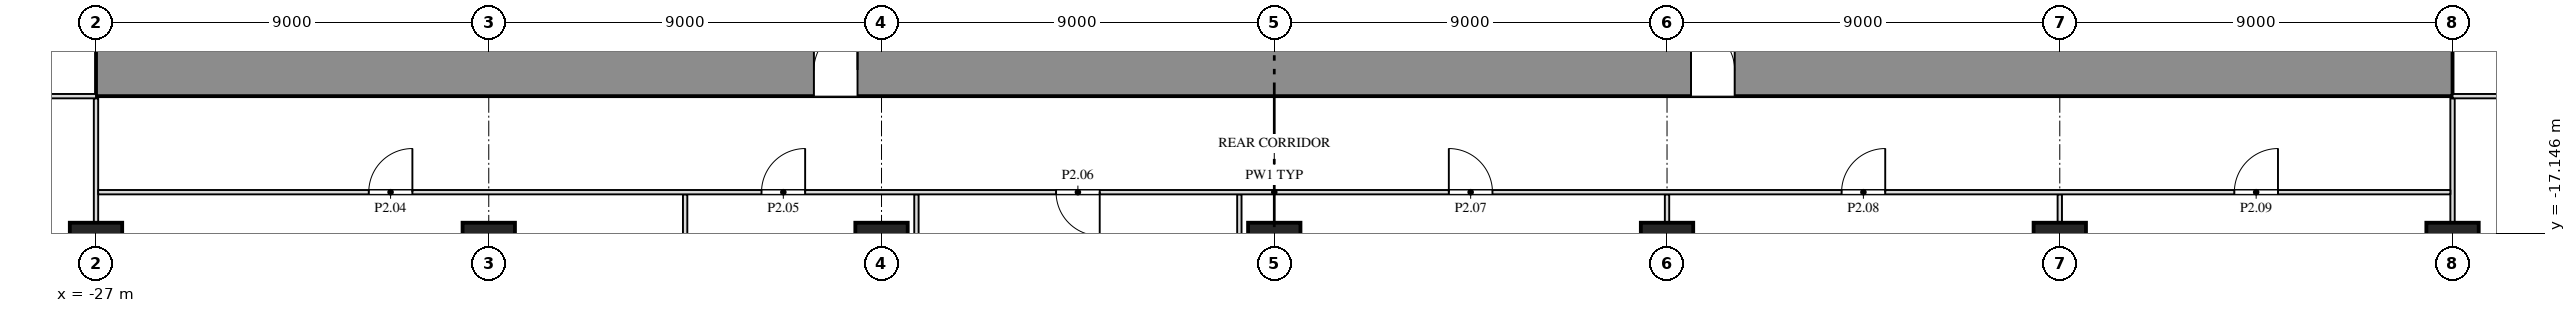
"""IFC4 building model, lengths in metres.
Left out: names, types, materials, properties, quantities, classifications, styles, units other than length and angle.
Written with IfcOpenShell. Run it as: python <this file> out.ifc"""

import sys

from ifc_helpers import new_model, si_unit, direction, frame, frame_2d, origin, origin_2d, place, context, subcontext, project, spatial, rectangle, extrude, element, fill, save


model = new_model("IFC4")
c1 = context("Model", 3, precision=1e-05, world=origin(), true_north=direction((0.0, 1.0)))
c2 = subcontext(c1, "Body", "Model", "MODEL_VIEW")
j1 = project(units=[si_unit("LENGTHUNIT", "METRE"), si_unit("PLANEANGLEUNIT", "RADIAN")], contexts=[c1])
p1 = place(None, origin())
s1 = spatial("IfcSite", under=j1, at=p1, CompositionType="ELEMENT")
p2 = place(p1, origin())
s2 = spatial("IfcBuilding", under=s1, at=p2, CompositionType="ELEMENT")
p3 = place(p2, frame((0.0, 0.0, 15.0)))
s3 = spatial("IfcBuildingStorey", under=s2, at=p3, CompositionType="ELEMENT", Elevation=15.0)
for number, where, z_axis, x_axis in (
    (1, (-27.0, -17.5, 0.0), (0.0, 0.0, 1.0), (1.0, 0.0, 0.0)),
    (2, (-18.0, -17.5, 0.0), (0.0, 0.0, 1.0), (1.0, 0.0, 0.0)),
    (3, (-9.0, -17.5, 0.0), (0.0, 0.0, 1.0), (1.0, 0.0, 0.0)),
    (4, (0.0, -17.5, 0.0), (0.0, 0.0, 1.0), (1.0, 0.0, 0.0)),
    (5, (9.0, -17.5, 0.0), (0.0, 0.0, 1.0), (1.0, 0.0, 0.0)),
    (6, (18.0, -17.5, 0.0), (0.0, 0.0, 1.0), (1.0, 0.0, 0.0)),
    (7, (27.0, -17.5, 0.0), (0.0, 0.0, 1.0), (1.0, 0.0, 0.0)),
):
    element("IfcColumn", number, at=place(p3, frame(where, z_axis=z_axis, x_axis=x_axis)), inside=s3, PredefinedType="COLUMN", context=c2, shape_type="SweptSolid", body=[
        extrude(rectangle(XDim=1.2, YDim=1.2, at=origin_2d()), origin(), (0.0, 0.0, 1.0), 6.0),
    ])
p4 = place(p3, frame((-27.0, -13.4, 0.0), z_axis=(0.0, 0.0, 1.0), x_axis=(1.0, 0.0, 0.0)))
e8 = element("IfcWall", 8, at=p4, inside=s3, PredefinedType="SHEAR", context=c2, shape_type="SweptSolid", body=[
    extrude(rectangle(XDim=54.0, YDim=1.2, at=frame_2d((27.0, 0.0))), origin(), (0.0, 0.0, 1.0), 5.7),
])
p5 = place(p4, frame((16.45, 0.0, 0.0)))
e9 = element("IfcOpeningElement", 9, at=p5, cuts=e8, PredefinedType="OPENING", context=c2, shape_type="SweptSolid", body=[
    extrude(rectangle(XDim=1.0, YDim=2.1, at=frame_2d((0.5, 1.05))), frame((0.0, 0.612, 0.0), z_axis=(0.0, -1.0, 0.0), x_axis=(1.0, 0.0, 0.0)), (0.0, 0.0, 1.0), 1.224),
])
p6 = place(p4, frame((36.55, 0.0, 0.0)))
e10 = element("IfcOpeningElement", 10, at=p6, cuts=e8, PredefinedType="OPENING", context=c2, shape_type="SweptSolid", body=[
    extrude(rectangle(XDim=1.0, YDim=2.1, at=frame_2d((0.5, 1.05))), frame((0.0, 0.612, 0.0), z_axis=(0.0, -1.0, 0.0), x_axis=(1.0, 0.0, 0.0)), (0.0, 0.0, 1.0), 1.224),
])
p7 = place(p3, frame((-27.0, -16.9, 0.0), z_axis=(0.0, 0.0, 1.0), x_axis=(0.0, 1.0, 0.0)))
e11 = element("IfcWall", 11, at=p7, inside=s3, PredefinedType="PARTITIONING", context=c2, shape_type="SweptSolid", body=[
    extrude(rectangle(XDim=2.85, YDim=0.1, at=frame_2d((1.425, 0.0))), origin(), (0.0, 0.0, 1.0), 5.088),
])
p8 = place(p3, frame((-13.5, -26.663, 0.0), z_axis=(0.0, 0.0, 1.0), x_axis=(0.0, 1.0, 0.0)))
e12 = element("IfcWall", 12, at=p8, inside=s3, PredefinedType="PARTITIONING", context=c2, shape_type="SweptSolid", body=[
    extrude(rectangle(XDim=10.413, YDim=0.1, at=frame_2d((5.206, 0.0))), origin(), (0.0, 0.0, 1.0), 5.088),
])
for number, where, z_axis, x_axis in (
    (13, (-8.2, -27.2, 0.0), (0.0, 0.0, 1.0), (0.0, 1.0, 0.0)),
    (14, (-0.8, -27.2, 0.0), (0.0, 0.0, 1.0), (0.0, 1.0, 0.0)),
):
    element("IfcWall", number, at=place(p3, frame(where, z_axis=z_axis, x_axis=x_axis)), inside=s3, PredefinedType="PARTITIONING", context=c2, shape_type="SweptSolid", body=[
        extrude(rectangle(XDim=10.95, YDim=0.1, at=frame_2d((5.475, 0.0))), origin(), (0.0, 0.0, 1.0), 5.7),
    ])
for number, where, z_axis, x_axis in (
    (15, (9.0, -16.9, 0.0), (0.0, 0.0, 1.0), (0.0, 1.0, 0.0)),
    (16, (18.0, -16.9, 0.0), (0.0, 0.0, 1.0), (0.0, 1.0, 0.0)),
):
    element("IfcWall", number, at=place(p3, frame(where, z_axis=z_axis, x_axis=x_axis)), inside=s3, PredefinedType="PARTITIONING", context=c2, shape_type="SweptSolid", body=[
        extrude(rectangle(XDim=0.65, YDim=0.1, at=frame_2d((0.325, 0.0))), origin(), (0.0, 0.0, 1.0), 5.7),
    ])
p9 = place(p3, frame((27.0, -16.9, 0.0), z_axis=(0.0, 0.0, 1.0), x_axis=(0.0, 1.0, 0.0)))
e17 = element("IfcWall", 17, at=p9, inside=s3, PredefinedType="PARTITIONING", context=c2, shape_type="SweptSolid", body=[
    extrude(rectangle(XDim=2.85, YDim=0.1, at=frame_2d((1.425, 0.0))), origin(), (0.0, 0.0, 1.0), 5.088),
])
p10 = place(p3, frame((-26.95, -16.2, 0.0), z_axis=(0.0, 0.0, 1.0), x_axis=(1.0, 0.0, 0.0)))
e18 = element("IfcWall", 18, at=p10, inside=s3, PredefinedType="PARTITIONING", context=c2, shape_type="SweptSolid", body=[
    extrude(rectangle(XDim=53.9, YDim=0.1, at=frame_2d((26.95, 0.0))), origin(), (0.0, 0.0, 1.0), 5.7),
])
p11 = place(p10, frame((6.2, 0.0, 0.0)))
e19 = element("IfcOpeningElement", 19, at=p11, cuts=e18, PredefinedType="OPENING", context=c2, shape_type="SweptSolid", body=[
    extrude(rectangle(XDim=1.0, YDim=2.1, at=frame_2d((0.5, 1.05))), frame((0.0, 0.062, 0.0), z_axis=(0.0, -1.0, 0.0), x_axis=(1.0, 0.0, 0.0)), (0.0, 0.0, 1.0), 0.124),
])
p12 = place(p10, frame((15.2, 0.0, 0.0)))
e20 = element("IfcOpeningElement", 20, at=p12, cuts=e18, PredefinedType="OPENING", context=c2, shape_type="SweptSolid", body=[
    extrude(rectangle(XDim=1.0, YDim=2.1, at=frame_2d((0.5, 1.05))), frame((0.0, 0.062, 0.0), z_axis=(0.0, -1.0, 0.0), x_axis=(1.0, 0.0, 0.0)), (0.0, 0.0, 1.0), 0.124),
])
p13 = place(p10, frame((21.95, 0.0, 0.0)))
e21 = element("IfcOpeningElement", 21, at=p13, cuts=e18, PredefinedType="OPENING", context=c2, shape_type="SweptSolid", body=[
    extrude(rectangle(XDim=1.0, YDim=2.1, at=frame_2d((0.5, 1.05))), frame((0.0, 0.062, 0.0), z_axis=(0.0, -1.0, 0.0), x_axis=(1.0, 0.0, 0.0)), (0.0, 0.0, 1.0), 0.124),
])
p14 = place(p10, frame((30.95, 0.0, 0.0)))
e22 = element("IfcOpeningElement", 22, at=p14, cuts=e18, PredefinedType="OPENING", context=c2, shape_type="SweptSolid", body=[
    extrude(rectangle(XDim=1.0, YDim=2.1, at=frame_2d((0.5, 1.05))), frame((0.0, 0.062, 0.0), z_axis=(0.0, -1.0, 0.0), x_axis=(1.0, 0.0, 0.0)), (0.0, 0.0, 1.0), 0.124),
])
p15 = place(p10, frame((39.95, 0.0, 0.0)))
e23 = element("IfcOpeningElement", 23, at=p15, cuts=e18, PredefinedType="OPENING", context=c2, shape_type="SweptSolid", body=[
    extrude(rectangle(XDim=1.0, YDim=2.1, at=frame_2d((0.5, 1.05))), frame((0.0, 0.062, 0.0), z_axis=(0.0, -1.0, 0.0), x_axis=(1.0, 0.0, 0.0)), (0.0, 0.0, 1.0), 0.124),
])
p16 = place(p10, frame((48.95, 0.0, 0.0)))
e24 = element("IfcOpeningElement", 24, at=p16, cuts=e18, PredefinedType="OPENING", context=c2, shape_type="SweptSolid", body=[
    extrude(rectangle(XDim=1.0, YDim=2.1, at=frame_2d((0.5, 1.05))), frame((0.0, 0.062, 0.0), z_axis=(0.0, -1.0, 0.0), x_axis=(1.0, 0.0, 0.0)), (0.0, 0.0, 1.0), 0.124),
])
p17 = place(p3, frame((-38.2, -14.0, 0.0), z_axis=(0.0, 0.0, 1.0), x_axis=(1.0, 0.0, 0.0)))
e25 = element("IfcWall", 25, at=p17, inside=s3, PredefinedType="PARTITIONING", context=c2, shape_type="SweptSolid", body=[
    extrude(rectangle(XDim=11.2, YDim=0.1, at=frame_2d((5.6, 0.0))), origin(), (0.0, 0.0, 1.0), 5.7),
])
p18 = place(p17, frame((3.2, 0.0, 0.0)))
e26 = element("IfcOpeningElement", 26, at=p18, cuts=e25, PredefinedType="OPENING", context=c2, shape_type="SweptSolid", body=[
    extrude(rectangle(XDim=1.0, YDim=2.1, at=frame_2d((0.5, 1.05))), frame((0.0, 0.062, 0.0), z_axis=(0.0, -1.0, 0.0), x_axis=(1.0, 0.0, 0.0)), (0.0, 0.0, 1.0), 0.124),
])
p19 = place(p3, frame((27.0, -14.0, 0.0), z_axis=(0.0, 0.0, 1.0), x_axis=(1.0, 0.0, 0.0)))
e27 = element("IfcWall", 27, at=p19, inside=s3, PredefinedType="PARTITIONING", context=c2, shape_type="SweptSolid", body=[
    extrude(rectangle(XDim=11.2, YDim=0.1, at=frame_2d((5.6, 0.0))), origin(), (0.0, 0.0, 1.0), 5.7),
])
p20 = place(p19, frame((7.0, 0.0, 0.0)))
e28 = element("IfcOpeningElement", 28, at=p20, cuts=e27, PredefinedType="OPENING", context=c2, shape_type="SweptSolid", body=[
    extrude(rectangle(XDim=1.0, YDim=2.1, at=frame_2d((0.5, 1.05))), frame((0.0, 0.062, 0.0), z_axis=(0.0, -1.0, 0.0), x_axis=(1.0, 0.0, 0.0)), (0.0, 0.0, 1.0), 0.124),
])
p21 = place(p11, origin())
e29 = element("IfcDoor", 29, at=p21, inside=s3, OperationType="SINGLE_SWING_RIGHT", PredefinedType="DOOR", context=c2, shape_type="SweptSolid", body=[
    extrude(rectangle(XDim=1.0, YDim=2.1, at=frame_2d((0.5, 1.05))), frame((0.0, 0.025, 0.0), z_axis=(0.0, -1.0, 0.0), x_axis=(1.0, 0.0, 0.0)), (0.0, 0.0, 1.0), 0.05),
])
fill(e19, e29)
p22 = place(p12, origin())
e30 = element("IfcDoor", 30, at=p22, inside=s3, OperationType="SINGLE_SWING_RIGHT", PredefinedType="DOOR", context=c2, shape_type="SweptSolid", body=[
    extrude(rectangle(XDim=1.0, YDim=2.1, at=frame_2d((0.5, 1.05))), frame((0.0, 0.025, 0.0), z_axis=(0.0, -1.0, 0.0), x_axis=(1.0, 0.0, 0.0)), (0.0, 0.0, 1.0), 0.05),
])
fill(e20, e30)
p23 = place(p13, origin())
e31 = element("IfcDoor", 31, at=p23, inside=s3, OperationType="SINGLE_SWING_LEFT", PredefinedType="DOOR", context=c2, shape_type="SweptSolid", body=[
    extrude(rectangle(XDim=1.0, YDim=2.1, at=frame_2d((0.5, 1.05))), frame((0.0, 0.025, 0.0), z_axis=(0.0, -1.0, 0.0), x_axis=(1.0, 0.0, 0.0)), (0.0, 0.0, 1.0), 0.05),
])
fill(e21, e31)
p24 = place(p14, origin())
e32 = element("IfcDoor", 32, at=p24, inside=s3, OperationType="SINGLE_SWING_LEFT", PredefinedType="DOOR", context=c2, shape_type="SweptSolid", body=[
    extrude(rectangle(XDim=1.0, YDim=2.1, at=frame_2d((0.5, 1.05))), frame((0.0, 0.025, 0.0), z_axis=(0.0, -1.0, 0.0), x_axis=(1.0, 0.0, 0.0)), (0.0, 0.0, 1.0), 0.05),
])
fill(e22, e32)
p25 = place(p15, origin())
e33 = element("IfcDoor", 33, at=p25, inside=s3, OperationType="SINGLE_SWING_RIGHT", PredefinedType="DOOR", context=c2, shape_type="SweptSolid", body=[
    extrude(rectangle(XDim=1.0, YDim=2.1, at=frame_2d((0.5, 1.05))), frame((0.0, 0.025, 0.0), z_axis=(0.0, -1.0, 0.0), x_axis=(1.0, 0.0, 0.0)), (0.0, 0.0, 1.0), 0.05),
])
fill(e23, e33)
p26 = place(p16, origin())
e34 = element("IfcDoor", 34, at=p26, inside=s3, OperationType="SINGLE_SWING_RIGHT", PredefinedType="DOOR", context=c2, shape_type="SweptSolid", body=[
    extrude(rectangle(XDim=1.0, YDim=2.1, at=frame_2d((0.5, 1.05))), frame((0.0, 0.025, 0.0), z_axis=(0.0, -1.0, 0.0), x_axis=(1.0, 0.0, 0.0)), (0.0, 0.0, 1.0), 0.05),
])
fill(e24, e34)
p27 = place(p5, origin())
e35 = element("IfcDoor", 35, at=p27, inside=s3, OperationType="SINGLE_SWING_RIGHT", PredefinedType="DOOR", context=c2, shape_type="SweptSolid", body=[
    extrude(rectangle(XDim=1.0, YDim=2.1, at=frame_2d((0.5, 1.05))), frame((0.0, 0.025, 0.0), z_axis=(0.0, -1.0, 0.0), x_axis=(1.0, 0.0, 0.0)), (0.0, 0.0, 1.0), 0.05),
])
fill(e9, e35)
p28 = place(p6, origin())
e36 = element("IfcDoor", 36, at=p28, inside=s3, OperationType="SINGLE_SWING_LEFT", PredefinedType="DOOR", context=c2, shape_type="SweptSolid", body=[
    extrude(rectangle(XDim=1.0, YDim=2.1, at=frame_2d((0.5, 1.05))), frame((0.0, 0.025, 0.0), z_axis=(0.0, -1.0, 0.0), x_axis=(1.0, 0.0, 0.0)), (0.0, 0.0, 1.0), 0.05),
])
fill(e10, e36)
save(model, sys.argv[1])
